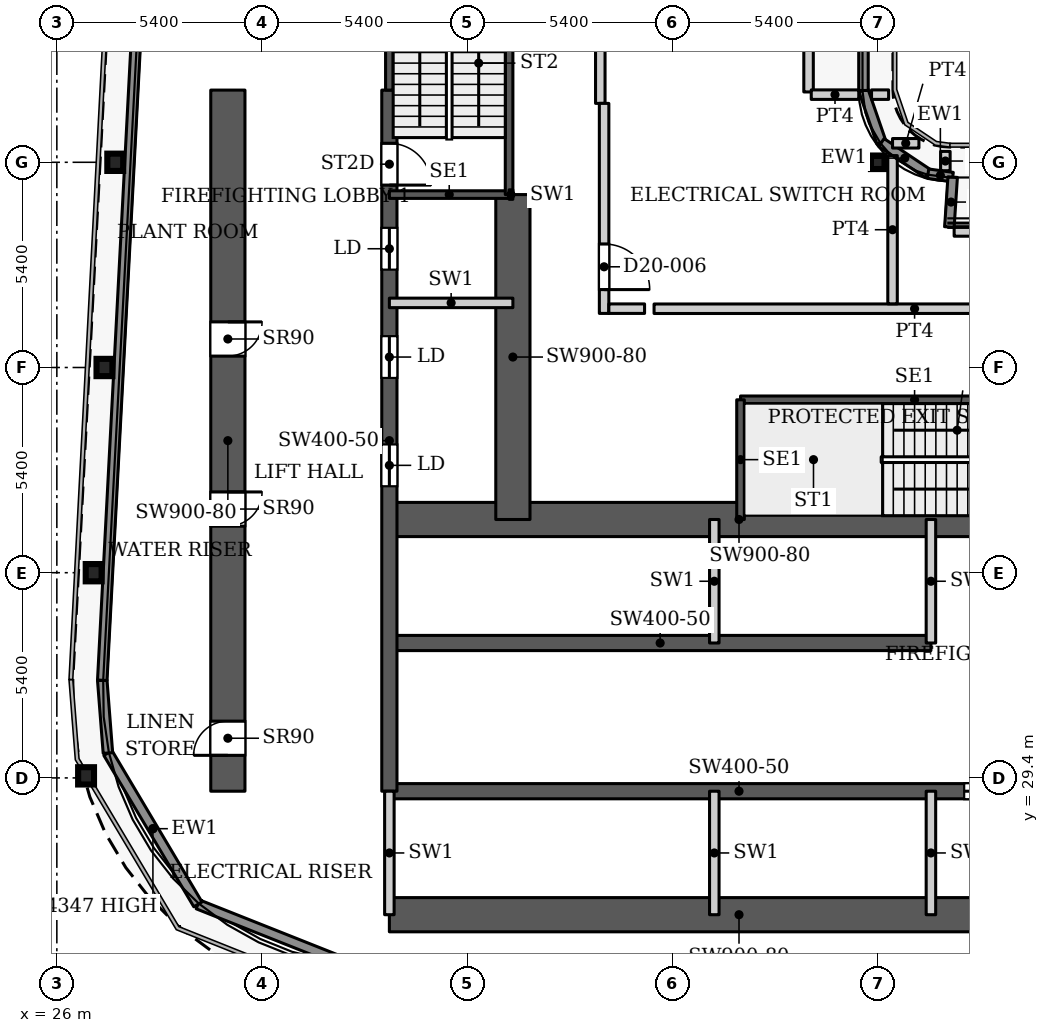
"""IFC4 building model, lengths in metres.
Left out: names, types, materials, properties, quantities, classifications, styles, units other than length and angle.
Written with IfcOpenShell. Run it as: python <this file> out.ifc"""

import sys

from ifc_helpers import new_model, si_unit, direction, frame, frame_2d, origin, origin_2d, place, context, subcontext, project, spatial, rectangle, hollow_rectangle, i_section, extrude, source, transform, mapped, element, fill, save


model = new_model("IFC4")
c1 = context("Model", 3, precision=1e-05, world=origin(), true_north=direction((0.0, 1.0)))
c2 = subcontext(c1, "Body", "Model", "MODEL_VIEW")
j1 = project(units=[si_unit("LENGTHUNIT", "METRE"), si_unit("PLANEANGLEUNIT", "RADIAN")], contexts=[c1])
p1 = place(None, origin())
s1 = spatial("IfcSite", under=j1, at=p1, CompositionType="ELEMENT")
p2 = place(p1, origin())
s2 = spatial("IfcBuilding", under=s1, at=p2, CompositionType="ELEMENT")
p3 = place(p2, frame((0.0, 0.0, 89.0)))
s3 = spatial("IfcBuildingStorey", under=s2, at=p3, CompositionType="ELEMENT", Elevation=89.0)
for number, where, z_axis, x_axis in (
    (1, (26.769, 29.454, 0.0), (0.0, 0.0, 1.0), (1.0, 0.0, 0.0)),
    (2, (26.969, 34.8, 0.0), (0.0, 0.0, 1.0), (1.0, 0.0, 0.0)),
    (3, (27.253, 40.2, 0.0), (0.0, 0.0, 1.0), (1.0, 0.0, 0.0)),
    (4, (27.537, 45.6, 0.0), (0.0, 0.0, 1.0), (1.0, 0.0, 0.0)),
):
    element("IfcColumn", number, at=place(p3, frame(where, z_axis=z_axis, x_axis=x_axis)), inside=s3, PredefinedType="COLUMN", context=c2, shape_type="SweptSolid", body=[
        extrude(i_section(OverallWidth=0.418, OverallDepth=0.455, WebThickness=0.042, FlangeThickness=0.068, FilletRadius=0.014, at=origin_2d()), origin(), (0.0, 0.0, 1.0), 5.1),
    ])
p4 = place(p3, frame((47.6, 45.6, 0.0), z_axis=(0.0, 0.0, 1.0), x_axis=(1.0, 0.0, 0.0)))
e5 = element("IfcColumn", 5, at=p4, inside=s3, PredefinedType="COLUMN", context=c2, shape_type="SweptSolid", body=[
    extrude(hollow_rectangle(XDim=0.356, YDim=0.356, WallThickness=0.016, InnerFilletRadius=0.016, OuterFilletRadius=0.032, at=origin_2d()), origin(), (0.0, 0.0, 1.0), 5.1),
])
p5 = place(p3, frame((34.75, 25.8, 0.0), z_axis=(0.0, 0.0, 1.0), x_axis=(1.0, 0.0, 0.0)))
e6 = element("IfcWall", 6, at=p5, inside=s3, PredefinedType="SHEAR", context=c2, shape_type="SweptSolid", body=[
    extrude(rectangle(XDim=18.4, YDim=0.9, at=frame_2d((9.2, 0.0))), origin(), (0.0, 0.0, 1.0), 5.1),
])
p6 = place(p3, frame((34.75, 29.05, 0.0), z_axis=(0.0, 0.0, 1.0), x_axis=(1.0, 0.0, 0.0)))
e7 = element("IfcWall", 7, at=p6, inside=s3, PredefinedType="SHEAR", context=c2, shape_type="SweptSolid", body=[
    extrude(rectangle(XDim=18.4, YDim=0.4, at=frame_2d((9.2, 0.0))), origin(), (0.0, 0.0, 1.0), 5.1),
])
p7 = place(p6, frame((15.125, 0.0, 0.0)))
e8 = element("IfcOpeningElement", 8, at=p7, cuts=e7, PredefinedType="OPENING", context=c2, shape_type="SweptSolid", body=[
    extrude(rectangle(XDim=1.1, YDim=2.2, at=frame_2d((0.55, 1.1))), frame((0.0, 0.21, 0.0), z_axis=(0.0, -1.0, 0.0), x_axis=(1.0, 0.0, 0.0)), (0.0, 0.0, 1.0), 0.42),
])
p8 = place(p3, frame((34.75, 32.95, 0.0), z_axis=(0.0, 0.0, 1.0), x_axis=(1.0, 0.0, 0.0)))
e9 = element("IfcWall", 9, at=p8, inside=s3, PredefinedType="SHEAR", context=c2, shape_type="SweptSolid", body=[
    extrude(rectangle(XDim=14.25, YDim=0.4, at=frame_2d((7.125, 0.0))), origin(), (0.0, 0.0, 1.0), 5.1),
])
p9 = place(p3, frame((34.75, 36.2, 0.0), z_axis=(0.0, 0.0, 1.0), x_axis=(1.0, 0.0, 0.0)))
e10 = element("IfcWall", 10, at=p9, inside=s3, PredefinedType="SHEAR", context=c2, shape_type="SweptSolid", body=[
    extrude(rectangle(XDim=18.4, YDim=0.9, at=frame_2d((9.2, 0.0))), origin(), (0.0, 0.0, 1.0), 5.1),
])
p10 = place(p9, frame((16.9, 0.0, 0.0)))
e11 = element("IfcOpeningElement", 11, at=p10, cuts=e10, PredefinedType="OPENING", context=c2, shape_type="SweptSolid", body=[
    extrude(rectangle(XDim=1.0, YDim=2.2, at=frame_2d((0.5, 1.1))), frame((0.0, 0.46, 0.0), z_axis=(0.0, -1.0, 0.0), x_axis=(1.0, 0.0, 0.0)), (0.0, 0.0, 1.0), 0.92),
])
p11 = place(p3, frame((34.75, 29.05, 0.0), z_axis=(0.0, 0.0, 1.0), x_axis=(0.0, 1.0, 0.0)))
e12 = element("IfcWall", 12, at=p11, inside=s3, PredefinedType="SHEAR", context=c2, shape_type="SweptSolid", body=[
    extrude(rectangle(XDim=18.45, YDim=0.4, at=frame_2d((9.225, 0.0))), origin(), (0.0, 0.0, 1.0), 5.1),
])
p12 = place(p11, frame((8.025, 0.0, 0.0)))
e13 = element("IfcOpeningElement", 13, at=p12, cuts=e12, PredefinedType="OPENING", context=c2, shape_type="SweptSolid", body=[
    extrude(rectangle(XDim=1.1, YDim=2.2, at=frame_2d((0.55, 1.1))), frame((0.0, 0.21, 0.0), z_axis=(0.0, -1.0, 0.0), x_axis=(1.0, 0.0, 0.0)), (0.0, 0.0, 1.0), 0.42),
])
p13 = place(p11, frame((10.875, 0.0, 0.0)))
e14 = element("IfcOpeningElement", 14, at=p13, cuts=e12, PredefinedType="OPENING", context=c2, shape_type="SweptSolid", body=[
    extrude(rectangle(XDim=1.1, YDim=2.2, at=frame_2d((0.55, 1.1))), frame((0.0, 0.21, 0.0), z_axis=(0.0, -1.0, 0.0), x_axis=(1.0, 0.0, 0.0)), (0.0, 0.0, 1.0), 0.42),
])
p14 = place(p11, frame((13.725, 0.0, 0.0)))
e15 = element("IfcOpeningElement", 15, at=p14, cuts=e12, PredefinedType="OPENING", context=c2, shape_type="SweptSolid", body=[
    extrude(rectangle(XDim=1.1, YDim=2.2, at=frame_2d((0.55, 1.1))), frame((0.0, 0.21, 0.0), z_axis=(0.0, -1.0, 0.0), x_axis=(1.0, 0.0, 0.0)), (0.0, 0.0, 1.0), 0.42),
])
p15 = place(p11, frame((15.95, 0.0, 0.0)))
e16 = element("IfcOpeningElement", 16, at=p15, cuts=e12, PredefinedType="OPENING", context=c2, shape_type="SweptSolid", body=[
    extrude(rectangle(XDim=1.1, YDim=2.2, at=frame_2d((0.55, 1.1))), frame((0.0, 0.21, 0.0), z_axis=(0.0, -1.0, 0.0), x_axis=(1.0, 0.0, 0.0)), (0.0, 0.0, 1.0), 0.42),
])
p16 = place(p3, frame((38.0, 36.2, 0.0), z_axis=(0.0, 0.0, 1.0), x_axis=(0.0, 1.0, 0.0)))
e17 = element("IfcWall", 17, at=p16, inside=s3, PredefinedType="SHEAR", context=c2, shape_type="SweptSolid", body=[
    extrude(rectangle(XDim=8.55, YDim=0.9, at=frame_2d((4.275, 0.0))), origin(), (0.0, 0.0, 1.0), 5.1),
])
p17 = place(p3, frame((30.5, 29.05, 0.0), z_axis=(0.0, 0.0, 1.0), x_axis=(0.0, 1.0, 0.0)))
e18 = element("IfcWall", 18, at=p17, inside=s3, PredefinedType="SHEAR", context=c2, shape_type="SweptSolid", body=[
    extrude(rectangle(XDim=18.45, YDim=0.9, at=frame_2d((9.225, 0.0))), origin(), (0.0, 0.0, 1.0), 5.1),
])
p18 = place(p17, frame((0.944, 0.0, 0.0)))
e19 = element("IfcOpeningElement", 19, at=p18, cuts=e18, PredefinedType="OPENING", context=c2, shape_type="SweptSolid", body=[
    extrude(rectangle(XDim=0.9, YDim=2.2, at=frame_2d((0.45, 1.1))), frame((0.0, 0.46, 0.0), z_axis=(0.0, -1.0, 0.0), x_axis=(1.0, 0.0, 0.0)), (0.0, 0.0, 1.0), 0.92),
])
p19 = place(p17, frame((6.975, 0.0, 0.0)))
e20 = element("IfcOpeningElement", 20, at=p19, cuts=e18, PredefinedType="OPENING", context=c2, shape_type="SweptSolid", body=[
    extrude(rectangle(XDim=0.9, YDim=2.2, at=frame_2d((0.45, 1.1))), frame((0.0, 0.46, 0.0), z_axis=(0.0, -1.0, 0.0), x_axis=(1.0, 0.0, 0.0)), (0.0, 0.0, 1.0), 0.92),
])
p20 = place(p17, frame((11.45, 0.0, 0.0)))
e21 = element("IfcOpeningElement", 21, at=p20, cuts=e18, PredefinedType="OPENING", context=c2, shape_type="SweptSolid", body=[
    extrude(rectangle(XDim=0.9, YDim=2.2, at=frame_2d((0.45, 1.1))), frame((0.0, 0.46, 0.0), z_axis=(0.0, -1.0, 0.0), x_axis=(1.0, 0.0, 0.0)), (0.0, 0.0, 1.0), 0.92),
])
p21 = place(p3, frame((47.225, 47.49, 0.0), z_axis=(0.0, 0.0, 1.0), x_axis=(0.326317748334, -0.945260137276, 0.0)))
e22 = element("IfcWall", 22, at=p21, inside=s3, PredefinedType="SOLIDWALL", context=c2, shape_type="SweptSolid", body=[
    extrude(rectangle(XDim=1.449, YDim=0.25, at=frame_2d((0.725, 0.0))), origin(), (0.0, 0.0, 1.0), 4.95),
])
p22 = place(p3, frame((47.698, 46.12, 0.0), z_axis=(0.0, 0.0, 1.0), x_axis=(0.831413506611, -0.555654191943, 0.0)))
e23 = element("IfcWall", 23, at=p22, inside=s3, PredefinedType="SOLIDWALL", context=c2, shape_type="SweptSolid", body=[
    extrude(rectangle(XDim=1.476, YDim=0.25, at=frame_2d((0.738, 0.0))), origin(), (0.0, 0.0, 1.0), 4.95),
])
p23 = place(p3, frame((48.925, 45.3, 0.0), z_axis=(0.0, 0.0, 1.0), x_axis=(0.990444114284, -0.137914671008, 0.0)))
e24 = element("IfcWall", 24, at=p23, inside=s3, PredefinedType="SOLIDWALL", context=c2, shape_type="SweptSolid", body=[
    extrude(rectangle(XDim=0.653, YDim=0.25, at=frame_2d((0.327, 0.0))), origin(), (0.0, 0.0, 1.0), 4.95),
])
p24 = place(p3, frame((49.572, 45.21, 0.0), z_axis=(0.0, 0.0, 1.0), x_axis=(-0.065312093682, -0.997864885853, 0.0)))
e25 = element("IfcWall", 25, at=p24, inside=s3, PredefinedType="SOLIDWALL", context=c2, shape_type="SweptSolid", body=[
    extrude(rectangle(XDim=1.316, YDim=0.25, at=frame_2d((0.658, 0.0))), origin(), (0.0, 0.0, 1.0), 4.95),
])
p25 = place(p3, frame((34.039, 24.353, 0.0), z_axis=(0.0, 0.0, 1.0), x_axis=(-0.929352825399, 0.369192803184, 0.0)))
e26 = element("IfcWall", 26, at=p25, inside=s3, PredefinedType="SOLIDWALL", context=c2, shape_type="SweptSolid", body=[
    extrude(rectangle(XDim=4.656, YDim=0.25, at=frame_2d((2.328, 0.0))), origin(), (0.0, 0.0, 1.0), 4.95),
])
p26 = place(p3, frame((29.712, 26.072, 0.0), z_axis=(0.0, 0.0, 1.0), x_axis=(-0.511028049012, 0.859564036662, 0.0)))
e27 = element("IfcWall", 27, at=p26, inside=s3, PredefinedType="SOLIDWALL", context=c2, shape_type="SweptSolid", body=[
    extrude(rectangle(XDim=4.634, YDim=0.25, at=frame_2d((2.317, 0.0))), origin(), (0.0, 0.0, 1.0), 4.347),
])
p27 = place(p3, frame((27.344, 30.055, 0.0), z_axis=(0.0, 0.0, 1.0), x_axis=(-0.077571675317, 0.99698677784, 0.0)))
e28 = element("IfcWall", 28, at=p27, inside=s3, PredefinedType="SOLIDWALL", context=c2, shape_type="SweptSolid", body=[
    extrude(rectangle(XDim=1.92, YDim=0.25, at=frame_2d((0.96, 0.0))), origin(), (0.0, 0.0, 1.0), 4.95),
])
p28 = place(p3, frame((27.195, 31.969, 0.0), z_axis=(0.0, 0.0, 1.0), x_axis=(0.052556141556, 0.99861797099, 0.0)))
e29 = element("IfcWall", 29, at=p28, inside=s3, PredefinedType="SOLIDWALL", context=c2, shape_type="SweptSolid", body=[
    extrude(rectangle(XDim=66.651, YDim=0.25, at=frame_2d((33.326, 0.0))), origin(), (0.0, 0.0, 1.0), 4.95),
])
p29 = place(p3, frame((47.225, 98.66, 0.0), z_axis=(0.0, 0.0, 1.0), x_axis=(0.0, -1.0, 0.0)))
e30 = element("IfcWall", 30, at=p29, inside=s3, PredefinedType="SOLIDWALL", context=c2, shape_type="SweptSolid", body=[
    extrude(rectangle(XDim=51.17, YDim=0.25, at=frame_2d((25.585, 0.0))), origin(), (0.0, 0.0, 1.0), 4.95),
])
p30 = place(p3, frame((43.99, 39.35, 0.0), z_axis=(0.0, 0.0, 1.0), x_axis=(1.0, 0.0, 0.0)))
e31 = element("IfcWall", 31, at=p30, inside=s3, PredefinedType="SHEAR", context=c2, shape_type="SweptSolid", body=[
    extrude(rectangle(XDim=9.16, YDim=0.2, at=frame_2d((4.58, 0.0))), origin(), (0.0, 0.0, 1.0), 5.1),
])
p31 = place(p3, frame((43.99, 36.2, 0.0), z_axis=(0.0, 0.0, 1.0), x_axis=(0.0, 1.0, 0.0)))
e32 = element("IfcWall", 32, at=p31, inside=s3, PredefinedType="SHEAR", context=c2, shape_type="SweptSolid", body=[
    extrude(rectangle(XDim=3.15, YDim=0.2, at=frame_2d((1.575, 0.0))), origin(), (0.0, 0.0, 1.0), 5.1),
])
p32 = place(p3, frame((34.75, 44.75, 0.0), z_axis=(0.0, 0.0, 1.0), x_axis=(1.0, 0.0, 0.0)))
e33 = element("IfcWall", 33, at=p32, inside=s3, PredefinedType="SHEAR", context=c2, shape_type="SweptSolid", body=[
    extrude(rectangle(XDim=3.15, YDim=0.2, at=frame_2d((1.575, 0.0))), origin(), (0.0, 0.0, 1.0), 5.1),
])
p33 = place(p3, frame((34.75, 47.5, 0.0), z_axis=(0.0, 0.0, 1.0), x_axis=(0.0, 1.0, 0.0)))
e34 = element("IfcWall", 34, at=p33, inside=s3, PredefinedType="SHEAR", context=c2, shape_type="SweptSolid", body=[
    extrude(rectangle(XDim=6.41, YDim=0.2, at=frame_2d((3.205, 0.0))), origin(), (0.0, 0.0, 1.0), 5.1),
])
p34 = place(p3, frame((37.9, 44.75, 0.0), z_axis=(0.0, 0.0, 1.0), x_axis=(0.0, 1.0, 0.0)))
e35 = element("IfcWall", 35, at=p34, inside=s3, PredefinedType="SHEAR", context=c2, shape_type="SweptSolid", body=[
    extrude(rectangle(XDim=9.16, YDim=0.2, at=frame_2d((4.58, 0.0))), origin(), (0.0, 0.0, 1.0), 5.1),
])
for number, where, z_axis, x_axis in (
    (36, (34.75, 25.8, 0.0), (0.0, 0.0, 1.0), (0.0, 1.0, 0.0)),
    (37, (43.3, 25.8, 0.0), (0.0, 0.0, 1.0), (0.0, 1.0, 0.0)),
    (38, (43.3, 32.95, 0.0), (0.0, 0.0, 1.0), (0.0, 1.0, 0.0)),
    (39, (49.0, 25.8, 0.0), (0.0, 0.0, 1.0), (0.0, 1.0, 0.0)),
    (40, (49.0, 32.95, 0.0), (0.0, 0.0, 1.0), (0.0, 1.0, 0.0)),
    (41, (34.75, 41.9, 0.0), (0.0, 0.0, 1.0), (1.0, 0.0, 0.0)),
):
    element("IfcWall", number, at=place(p3, frame(where, z_axis=z_axis, x_axis=x_axis)), inside=s3, PredefinedType="PARTITIONING", context=c2, shape_type="SweptSolid", body=[
        extrude(rectangle(XDim=3.25, YDim=0.25, at=frame_2d((1.625, 0.0))), origin(), (0.0, 0.0, 1.0), 5.1),
    ])
p35 = place(p3, frame((37.9, 44.75, 0.0), z_axis=(0.0, 0.0, 1.0), x_axis=(1.0, 0.0, 0.0)))
e42 = element("IfcWall", 42, at=p35, inside=s3, PredefinedType="PARTITIONING", context=c2, shape_type="SweptSolid", body=[
    extrude(rectangle(XDim=0.1, YDim=0.25, at=frame_2d((0.05, 0.0))), origin(), (0.0, 0.0, 1.0), 5.1),
])
p36 = place(p3, frame((40.3, 47.15, 0.0), z_axis=(0.0, 0.0, 1.0), x_axis=(0.0, 1.0, 0.0)))
e43 = element("IfcWall", 43, at=p36, inside=s3, PredefinedType="PARTITIONING", context=c2, shape_type="SweptSolid", body=[
    extrude(rectangle(XDim=9.285, YDim=0.25, at=frame_2d((4.643, 0.0))), origin(), (0.0, 0.0, 1.0), 4.8),
])
p37 = place(p36, frame((4.812, 0.0, 0.0)))
e44 = element("IfcOpeningElement", 44, at=p37, cuts=e43, PredefinedType="OPENING", context=c2, shape_type="SweptSolid", body=[
    extrude(rectangle(XDim=1.2, YDim=2.1, at=frame_2d((0.6, 1.05))), frame((0.0, 0.135, 0.0), z_axis=(0.0, -1.0, 0.0), x_axis=(1.0, 0.0, 0.0)), (0.0, 0.0, 1.0), 0.27),
])
p38 = place(p3, frame((40.4, 41.623, 0.0), z_axis=(0.0, 0.0, 1.0), x_axis=(0.0, 1.0, 0.0)))
e45 = element("IfcWall", 45, at=p38, inside=s3, PredefinedType="PARTITIONING", context=c2, shape_type="SweptSolid", body=[
    extrude(rectangle(XDim=5.527, YDim=0.25, at=frame_2d((2.763, 0.0))), origin(), (0.0, 0.0, 1.0), 4.8),
])
p39 = place(p38, frame((0.627, 0.0, 0.0)))
e46 = element("IfcOpeningElement", 46, at=p39, cuts=e45, PredefinedType="OPENING", context=c2, shape_type="SweptSolid", body=[
    extrude(rectangle(XDim=1.2, YDim=2.1, at=frame_2d((0.6, 1.05))), frame((0.0, 0.135, 0.0), z_axis=(0.0, -1.0, 0.0), x_axis=(1.0, 0.0, 0.0)), (0.0, 0.0, 1.0), 0.27),
])
p40 = place(p3, frame((40.525, 41.748, 0.0), z_axis=(0.0, 0.0, 1.0), x_axis=(1.0, 0.0, 0.0)))
e47 = element("IfcWall", 47, at=p40, inside=s3, PredefinedType="PARTITIONING", context=c2, shape_type="SweptSolid", body=[
    extrude(rectangle(XDim=0.94, YDim=0.25, at=frame_2d((0.47, 0.0))), origin(), (0.0, 0.0, 1.0), 4.8),
])
p41 = place(p3, frame((41.715, 41.746, 0.0), z_axis=(0.0, 0.0, 1.0), x_axis=(0.999999989853, 0.000142460288, 0.0)))
e48 = element("IfcWall", 48, at=p41, inside=s3, PredefinedType="PARTITIONING", context=c2, shape_type="SweptSolid", body=[
    extrude(rectangle(XDim=13.71, YDim=0.25, at=frame_2d((6.855, 0.0))), origin(), (0.0, 0.0, 1.0), 4.8),
])
p42 = place(p3, frame((45.78, 47.451, 0.0), z_axis=(0.0, 0.0, 1.0), x_axis=(0.0, 1.0, 0.0)))
e49 = element("IfcWall", 49, at=p42, inside=s3, PredefinedType="PARTITIONING", context=c2, shape_type="SweptSolid", body=[
    extrude(rectangle(XDim=11.573, YDim=0.25, at=frame_2d((5.787, 0.0))), origin(), (0.0, 0.0, 1.0), 4.8),
])
p43 = place(p3, frame((45.851, 47.38, 0.0), z_axis=(0.0, 0.0, 1.0), x_axis=(1.0, 0.0, 0.0)))
e50 = element("IfcWall", 50, at=p43, inside=s3, PredefinedType="PARTITIONING", context=c2, shape_type="SweptSolid", body=[
    extrude(rectangle(XDim=1.25, YDim=0.25, at=frame_2d((0.625, 0.0))), origin(), (0.0, 0.0, 1.0), 4.8),
])
p44 = place(p3, frame((47.437, 47.38, 0.0), z_axis=(0.0, 0.0, 1.0), x_axis=(1.0, 0.0, 0.0)))
e51 = element("IfcWall", 51, at=p44, inside=s3, PredefinedType="PARTITIONING", context=c2, shape_type="SweptSolid", body=[
    extrude(rectangle(XDim=0.45, YDim=0.25, at=frame_2d((0.225, 0.0))), origin(), (0.0, 0.0, 1.0), 4.8),
])
p45 = place(p3, frame((47.99, 41.875, 0.0), z_axis=(0.0, 0.0, 1.0), x_axis=(0.0, 1.0, 0.0)))
e52 = element("IfcWall", 52, at=p45, inside=s3, PredefinedType="PARTITIONING", context=c2, shape_type="SweptSolid", body=[
    extrude(rectangle(XDim=3.901, YDim=0.25, at=frame_2d((1.95, 0.0))), origin(), (0.0, 0.0, 1.0), 4.8),
])
p46 = place(p3, frame((47.99, 46.1, 0.0), z_axis=(0.0, 0.0, 1.0), x_axis=(1.0, 0.0, 0.0)))
e53 = element("IfcWall", 53, at=p46, inside=s3, PredefinedType="PARTITIONING", context=c2, shape_type="SweptSolid", body=[
    extrude(rectangle(XDim=0.694, YDim=0.25, at=frame_2d((0.347, 0.0))), origin(), (0.0, 0.0, 1.0), 4.8),
])
p47 = place(p3, frame((49.38, 45.379, 0.0), z_axis=(0.0, 0.0, 1.0), x_axis=(0.0, 1.0, 0.0)))
e54 = element("IfcWall", 54, at=p47, inside=s3, PredefinedType="PARTITIONING", context=c2, shape_type="SweptSolid", body=[
    extrude(rectangle(XDim=0.508, YDim=0.25, at=frame_2d((0.254, 0.0))), origin(), (0.0, 0.0, 1.0), 4.8),
])
p48 = place(p3, frame((49.611, 43.78, 0.0), z_axis=(0.0, 0.0, 1.0), x_axis=(1.0, 0.0, 0.0)))
e55 = element("IfcWall", 55, at=p48, inside=s3, PredefinedType="PARTITIONING", context=c2, shape_type="SweptSolid", body=[
    extrude(rectangle(XDim=8.737, YDim=0.25, at=frame_2d((4.368, 0.0))), origin(), (0.0, 0.0, 1.0), 4.8),
])
m1 = source(origin(), c2, "Body", "SweptSolid", [
    extrude(rectangle(XDim=1.1, YDim=2.2, at=frame_2d((0.55, 1.1))), frame((0.0, 0.025, 0.0), z_axis=(0.0, -1.0, 0.0), x_axis=(1.0, 0.0, 0.0)), (0.0, 0.0, 1.0), 0.05),
])
p49 = place(p12, origin())
e56 = element("IfcDoor", 56, at=p49, inside=s3, OperationType="SLIDING_TO_LEFT", PredefinedType="DOOR", context=c2, shape_type="MappedRepresentation", body=[
    mapped(m1, transform((0.0, 0.0, 0.0), x_axis=(1.0, 0.0, 0.0), y_axis=(0.0, 1.0, 0.0), z_axis=(0.0, 0.0, 1.0), scale=1.0)),
])
fill(e13, e56)
p50 = place(p13, origin())
e57 = element("IfcDoor", 57, at=p50, inside=s3, OperationType="SLIDING_TO_LEFT", PredefinedType="DOOR", context=c2, shape_type="MappedRepresentation", body=[
    mapped(m1, transform((0.0, 0.0, 0.0), x_axis=(1.0, 0.0, 0.0), y_axis=(0.0, 1.0, 0.0), z_axis=(0.0, 0.0, 1.0), scale=1.0)),
])
fill(e14, e57)
p51 = place(p14, origin())
e58 = element("IfcDoor", 58, at=p51, inside=s3, OperationType="SLIDING_TO_LEFT", PredefinedType="DOOR", context=c2, shape_type="MappedRepresentation", body=[
    mapped(m1, transform((0.0, 0.0, 0.0), x_axis=(1.0, 0.0, 0.0), y_axis=(0.0, 1.0, 0.0), z_axis=(0.0, 0.0, 1.0), scale=1.0)),
])
fill(e15, e58)
p52 = place(p7, origin())
e59 = element("IfcDoor", 59, at=p52, inside=s3, OperationType="SLIDING_TO_LEFT", PredefinedType="DOOR", context=c2, shape_type="MappedRepresentation", body=[
    mapped(m1, transform((0.0, 0.0, 0.0), x_axis=(1.0, 0.0, 0.0), y_axis=(0.0, 1.0, 0.0), z_axis=(0.0, 0.0, 1.0), scale=1.0)),
])
fill(e8, e59)
m2 = source(origin(), c2, "Body", "SweptSolid", [
    extrude(rectangle(XDim=0.9, YDim=2.2, at=frame_2d((0.45, 1.1))), frame((0.0, 0.025, 0.0), z_axis=(0.0, -1.0, 0.0), x_axis=(1.0, 0.0, 0.0)), (0.0, 0.0, 1.0), 0.05),
])
p53 = place(p18, origin())
e60 = element("IfcDoor", 60, at=p53, inside=s3, OperationType="SINGLE_SWING_LEFT", PredefinedType="DOOR", context=c2, shape_type="MappedRepresentation", body=[
    mapped(m2, transform((0.0, 0.0, 0.0), x_axis=(1.0, 0.0, 0.0), y_axis=(0.0, 1.0, 0.0), z_axis=(0.0, 0.0, 1.0), scale=1.0)),
])
fill(e19, e60)
p54 = place(p19, origin())
e61 = element("IfcDoor", 61, at=p54, inside=s3, OperationType="SINGLE_SWING_RIGHT", PredefinedType="DOOR", context=c2, shape_type="MappedRepresentation", body=[
    mapped(m2, transform((0.0, 0.0, 0.0), x_axis=(1.0, 0.0, 0.0), y_axis=(0.0, 1.0, 0.0), z_axis=(0.0, 0.0, 1.0), scale=1.0)),
])
fill(e20, e61)
p55 = place(p20, origin())
e62 = element("IfcDoor", 62, at=p55, inside=s3, OperationType="SINGLE_SWING_RIGHT", PredefinedType="DOOR", context=c2, shape_type="MappedRepresentation", body=[
    mapped(m2, transform((0.0, 0.0, 0.0), x_axis=(1.0, 0.0, 0.0), y_axis=(0.0, 1.0, 0.0), z_axis=(0.0, 0.0, 1.0), scale=1.0)),
])
fill(e21, e62)
m3 = source(origin(), c2, "Body", "SweptSolid", [
    extrude(rectangle(XDim=1.1, YDim=2.2, at=frame_2d((0.55, 1.1))), frame((0.0, 0.025, 0.0), z_axis=(0.0, -1.0, 0.0), x_axis=(1.0, 0.0, 0.0)), (0.0, 0.0, 1.0), 0.05),
])
p56 = place(p15, origin())
e63 = element("IfcDoor", 63, at=p56, inside=s3, OperationType="SINGLE_SWING_RIGHT", PredefinedType="DOOR", context=c2, shape_type="MappedRepresentation", body=[
    mapped(m3, transform((0.0, 0.0, 0.0), x_axis=(1.0, 0.0, 0.0), y_axis=(0.0, 1.0, 0.0), z_axis=(0.0, 0.0, 1.0), scale=1.0)),
])
fill(e16, e63)
m4 = source(origin(), c2, "Body", "SweptSolid", [
    extrude(rectangle(XDim=1.2, YDim=2.1, at=frame_2d((0.6, 1.05))), frame((0.0, 0.025, 0.0), z_axis=(0.0, -1.0, 0.0), x_axis=(1.0, 0.0, 0.0)), (0.0, 0.0, 1.0), 0.05),
])
p57 = place(p39, origin())
e64 = element("IfcDoor", 64, at=p57, inside=s3, OperationType="SINGLE_SWING_RIGHT", PredefinedType="DOOR", context=c2, shape_type="MappedRepresentation", body=[
    mapped(m4, transform((0.0, 0.0, 0.0), x_axis=(1.0, 0.0, 0.0), y_axis=(0.0, 1.0, 0.0), z_axis=(0.0, 0.0, 1.0), scale=1.0)),
])
fill(e46, e64)
save(model, sys.argv[1])
